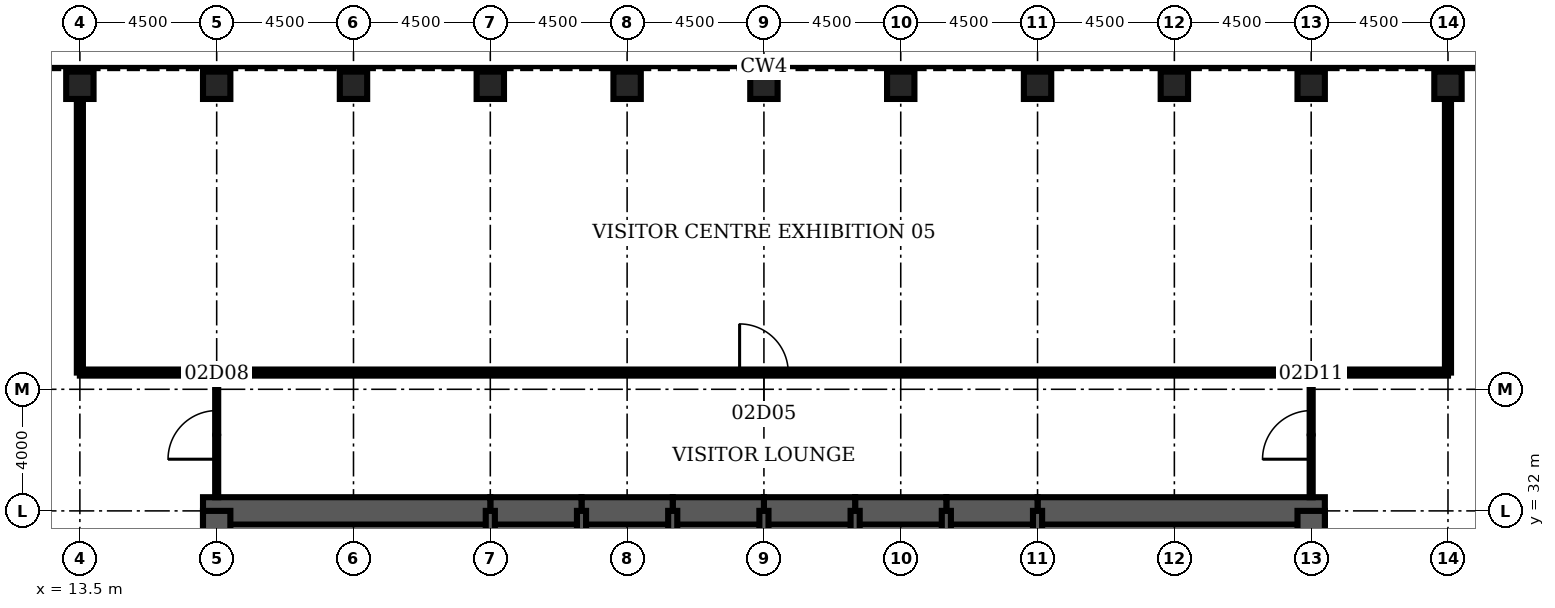
"""IFC4 building model, lengths in metres.
Left out: names, types, materials, properties, quantities, classifications, styles, units other than length and angle.
Written with IfcOpenShell. Run it as: python <this file> out.ifc"""

import sys

from ifc_helpers import new_model, si_unit, direction, frame, frame_2d, origin, origin_2d, place, context, subcontext, project, spatial, rectangle, hollow_rectangle, extrude, element, fill, save


model = new_model("IFC4")
c1 = context("Model", 3, precision=1e-05, world=origin(), true_north=direction((0.0, 1.0)))
c2 = subcontext(c1, "Body", "Model", "MODEL_VIEW")
j1 = project(units=[si_unit("LENGTHUNIT", "METRE"), si_unit("PLANEANGLEUNIT", "RADIAN")], contexts=[c1])
p1 = place(None, origin())
s1 = spatial("IfcSite", under=j1, at=p1, CompositionType="ELEMENT")
p2 = place(p1, origin())
s2 = spatial("IfcBuilding", under=s1, at=p2, CompositionType="ELEMENT")
p3 = place(p2, frame((0.0, 0.0, 13.0)))
s3 = spatial("IfcBuildingStorey", under=s2, at=p3, CompositionType="ELEMENT", Elevation=13.0)
for number, where, z_axis, x_axis in (
    (1, (58.5, 46.0, 0.0), (0.0, 0.0, 1.0), (0.0, 1.0, 0.0)),
    (2, (54.0, 46.0, 0.0), (0.0, 0.0, 1.0), (0.0, 1.0, 0.0)),
    (3, (49.5, 46.0, 0.0), (0.0, 0.0, 1.0), (0.0, 1.0, 0.0)),
    (4, (45.0, 46.0, 0.0), (0.0, 0.0, 1.0), (0.0, 1.0, 0.0)),
    (5, (40.5, 46.0, 0.0), (0.0, 0.0, 1.0), (0.0, 1.0, 0.0)),
    (6, (36.0, 46.0, 0.0), (0.0, 0.0, 1.0), (0.0, 1.0, 0.0)),
    (7, (31.5, 46.0, 0.0), (0.0, 0.0, 1.0), (0.0, 1.0, 0.0)),
    (8, (27.0, 46.0, 0.0), (0.0, 0.0, 1.0), (0.0, 1.0, 0.0)),
    (9, (22.5, 46.0, 0.0), (0.0, 0.0, 1.0), (0.0, 1.0, 0.0)),
    (10, (18.0, 46.0, 0.0), (0.0, 0.0, 1.0), (0.0, 1.0, 0.0)),
    (11, (13.5, 46.0, 0.0), (0.0, 0.0, 1.0), (0.0, 1.0, 0.0)),
):
    element("IfcColumn", number, at=place(p3, frame(where, z_axis=z_axis, x_axis=x_axis)), inside=s3, PredefinedType="COLUMN", context=c2, shape_type="SweptSolid", body=[
        extrude(hollow_rectangle(XDim=0.9, YDim=0.9, WallThickness=0.12, at=origin_2d()), origin(), (0.0, 0.0, 1.0), 5.0),
    ])
p4 = place(p3, frame((54.45, 32.0, 0.0), z_axis=(0.0, 0.0, 1.0), x_axis=(-1.0, 0.0, 0.0)))
e12 = element("IfcWall", 12, at=p4, inside=s3, PredefinedType="SHEAR", context=c2, shape_type="SweptSolid", body=[
    extrude(rectangle(XDim=9.45, YDim=0.9, at=frame_2d((4.725, 0.0))), origin(), (0.0, 0.0, 1.0), 5.0),
])
for number, where, z_axis, x_axis in (
    (13, (45.0, 32.0, 0.0), (0.0, 0.0, 1.0), (-1.0, 0.0, 0.0)),
    (14, (42.0, 32.0, 0.0), (0.0, 0.0, 1.0), (-1.0, 0.0, 0.0)),
    (15, (39.0, 32.0, 0.0), (0.0, 0.0, 1.0), (-1.0, 0.0, 0.0)),
    (16, (36.0, 32.0, 0.0), (0.0, 0.0, 1.0), (-1.0, 0.0, 0.0)),
    (17, (33.0, 32.0, 0.0), (0.0, 0.0, 1.0), (-1.0, 0.0, 0.0)),
    (18, (30.0, 32.0, 0.0), (0.0, 0.0, 1.0), (-1.0, 0.0, 0.0)),
):
    element("IfcWall", number, at=place(p3, frame(where, z_axis=z_axis, x_axis=x_axis)), inside=s3, PredefinedType="SHEAR", context=c2, shape_type="SweptSolid", body=[
        extrude(rectangle(XDim=3.0, YDim=0.9, at=frame_2d((1.5, 0.0))), origin(), (0.0, 0.0, 1.0), 5.0),
    ])
p5 = place(p3, frame((27.0, 32.0, 0.0), z_axis=(0.0, 0.0, 1.0), x_axis=(-1.0, 0.0, 0.0)))
e19 = element("IfcWall", 19, at=p5, inside=s3, PredefinedType="SHEAR", context=c2, shape_type="SweptSolid", body=[
    extrude(rectangle(XDim=9.45, YDim=0.9, at=frame_2d((4.725, 0.0))), origin(), (0.0, 0.0, 1.0), 5.0),
])
for number, where, z_axis, x_axis in (
    (20, (18.0, 32.0, 0.0), (0.0, 0.0, 1.0), (0.0, -1.0, 0.0)),
    (21, (54.0, 28.8, 0.0), (0.0, 0.0, 1.0), (0.0, 1.0, 0.0)),
):
    element("IfcWall", number, at=place(p3, frame(where, z_axis=z_axis, x_axis=x_axis)), inside=s3, PredefinedType="SHEAR", context=c2, shape_type="SweptSolid", body=[
        extrude(rectangle(XDim=3.2, YDim=0.9, at=frame_2d((1.6, 0.0))), origin(), (0.0, 0.0, 1.0), 5.0),
    ])
for number, where, z_axis, x_axis in (
    (22, (27.0, 28.8, 0.0), (0.0, 0.0, 1.0), (0.0, 1.0, 0.0)),
    (23, (30.0, 28.8, 0.0), (0.0, 0.0, 1.0), (0.0, 1.0, 0.0)),
    (24, (33.0, 28.8, 0.0), (0.0, 0.0, 1.0), (0.0, 1.0, 0.0)),
    (25, (36.0, 28.8, 0.0), (0.0, 0.0, 1.0), (0.0, 1.0, 0.0)),
    (26, (39.0, 28.8, 0.0), (0.0, 0.0, 1.0), (0.0, 1.0, 0.0)),
    (27, (42.0, 28.8, 0.0), (0.0, 0.0, 1.0), (0.0, 1.0, 0.0)),
    (28, (45.0, 28.8, 0.0), (0.0, 0.0, 1.0), (0.0, 1.0, 0.0)),
):
    element("IfcWall", number, at=place(p3, frame(where, z_axis=z_axis, x_axis=x_axis)), inside=s3, PredefinedType="SOLIDWALL", context=c2, shape_type="SweptSolid", body=[
        extrude(rectangle(XDim=3.2, YDim=0.3, at=frame_2d((1.6, 0.0))), origin(), (0.0, 0.0, 1.0), 5.0),
    ])
p6 = place(p3, frame((13.5, 36.55, 0.0), z_axis=(0.0, 0.0, 1.0), x_axis=(1.0, 0.0, 0.0)))
e29 = element("IfcWall", 29, at=p6, inside=s3, PredefinedType="PARTITIONING", context=c2, shape_type="SweptSolid", body=[
    extrude(rectangle(XDim=45.0, YDim=0.2, at=frame_2d((22.5, 0.0))), origin(), (0.0, 0.0, 1.0), 3.0),
])
p7 = place(p6, frame((21.7, 0.0, 0.0)))
e30 = element("IfcOpeningElement", 30, at=p7, cuts=e29, PredefinedType="OPENING", context=c2, shape_type="SweptSolid", body=[
    extrude(rectangle(XDim=1.6, YDim=2.1, at=frame_2d((0.8, 1.05))), frame((0.0, 0.11, 0.0), z_axis=(0.0, -1.0, 0.0), x_axis=(1.0, 0.0, 0.0)), (0.0, 0.0, 1.0), 0.22),
])
p8 = place(p3, frame((13.5, 36.55, 0.0), z_axis=(0.0, 0.0, 1.0), x_axis=(0.0, 1.0, 0.0)))
e31 = element("IfcWall", 31, at=p8, inside=s3, PredefinedType="PARTITIONING", context=c2, shape_type="SweptSolid", body=[
    extrude(rectangle(XDim=9.0, YDim=0.2, at=frame_2d((4.5, 0.0))), origin(), (0.0, 0.0, 1.0), 3.0),
])
p9 = place(p3, frame((18.0, 32.45, 0.0), z_axis=(0.0, 0.0, 1.0), x_axis=(0.0, 1.0, 0.0)))
e32 = element("IfcWall", 32, at=p9, inside=s3, PredefinedType="PARTITIONING", context=c2, shape_type="SweptSolid", body=[
    extrude(rectangle(XDim=4.1, YDim=0.1, at=frame_2d((2.05, 0.0))), origin(), (0.0, 0.0, 1.0), 3.0),
])
p10 = place(p9, frame((1.25, 0.0, 0.0)))
e33 = element("IfcOpeningElement", 33, at=p10, cuts=e32, PredefinedType="OPENING", context=c2, shape_type="SweptSolid", body=[
    extrude(rectangle(XDim=1.6, YDim=2.1, at=frame_2d((0.8, 1.05))), frame((0.0, 0.06, 0.0), z_axis=(0.0, -1.0, 0.0), x_axis=(1.0, 0.0, 0.0)), (0.0, 0.0, 1.0), 0.12),
])
p11 = place(p3, frame((54.0, 32.45, 0.0), z_axis=(0.0, 0.0, 1.0), x_axis=(0.0, 1.0, 0.0)))
e34 = element("IfcWall", 34, at=p11, inside=s3, PredefinedType="PARTITIONING", context=c2, shape_type="SweptSolid", body=[
    extrude(rectangle(XDim=4.1, YDim=0.1, at=frame_2d((2.05, 0.0))), origin(), (0.0, 0.0, 1.0), 3.0),
])
p12 = place(p11, frame((1.25, 0.0, 0.0)))
e35 = element("IfcOpeningElement", 35, at=p12, cuts=e34, PredefinedType="OPENING", context=c2, shape_type="SweptSolid", body=[
    extrude(rectangle(XDim=1.6, YDim=2.1, at=frame_2d((0.8, 1.05))), frame((0.0, 0.06, 0.0), z_axis=(0.0, -1.0, 0.0), x_axis=(1.0, 0.0, 0.0)), (0.0, 0.0, 1.0), 0.12),
])
p13 = place(p3, frame((58.5, 36.55, 0.0), z_axis=(0.0, 0.0, 1.0), x_axis=(0.0, 1.0, 0.0)))
e36 = element("IfcWall", 36, at=p13, inside=s3, PredefinedType="PARTITIONING", context=c2, shape_type="SweptSolid", body=[
    extrude(rectangle(XDim=9.0, YDim=0.2, at=frame_2d((4.5, 0.0))), origin(), (0.0, 0.0, 1.0), 3.0),
])
p14 = place(p7, origin())
e37 = element("IfcDoor", 37, at=p14, inside=s3, OperationType="SINGLE_SWING_LEFT", PredefinedType="DOOR", context=c2, shape_type="SweptSolid", body=[
    extrude(rectangle(XDim=1.6, YDim=2.1, at=frame_2d((0.8, 1.05))), frame((0.0, 0.025, 0.0), z_axis=(0.0, -1.0, 0.0), x_axis=(1.0, 0.0, 0.0)), (0.0, 0.0, 1.0), 0.05),
])
fill(e30, e37)
p15 = place(p10, origin())
e38 = element("IfcDoor", 38, at=p15, inside=s3, OperationType="SINGLE_SWING_LEFT", PredefinedType="DOOR", context=c2, shape_type="SweptSolid", body=[
    extrude(rectangle(XDim=1.6, YDim=2.1, at=frame_2d((0.8, 1.05))), frame((0.0, 0.025, 0.0), z_axis=(0.0, -1.0, 0.0), x_axis=(1.0, 0.0, 0.0)), (0.0, 0.0, 1.0), 0.05),
])
fill(e33, e38)
p16 = place(p12, origin())
e39 = element("IfcDoor", 39, at=p16, inside=s3, OperationType="SINGLE_SWING_LEFT", PredefinedType="DOOR", context=c2, shape_type="SweptSolid", body=[
    extrude(rectangle(XDim=1.6, YDim=2.1, at=frame_2d((0.8, 1.05))), frame((0.0, 0.025, 0.0), z_axis=(0.0, -1.0, 0.0), x_axis=(1.0, 0.0, 0.0)), (0.0, 0.0, 1.0), 0.05),
])
fill(e35, e39)
save(model, sys.argv[1])
